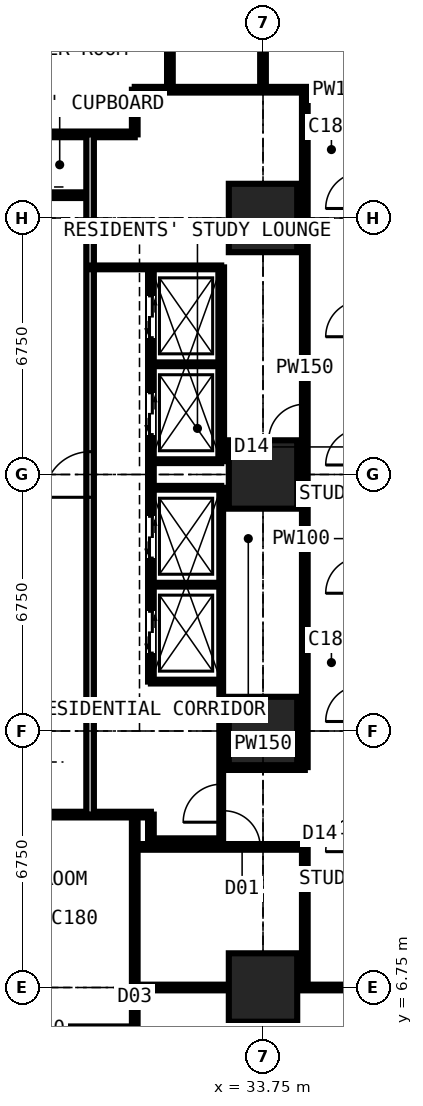
"""IFC4 building model, lengths in metres.
Left out: names, types, materials, properties, quantities, classifications, styles, units other than length and angle.
Written with IfcOpenShell. Run it as: python <this file> out.ifc"""

import sys

from ifc_helpers import new_model, si_unit, direction, frame, frame_2d, origin, origin_2d, place, context, subcontext, project, spatial, rectangle, extrude, element, fill, save


model = new_model("IFC4")
c1 = context("Model", 3, precision=1e-05, world=origin(), true_north=direction((0.0, 1.0)))
c2 = subcontext(c1, "Body", "Model", "MODEL_VIEW")
j1 = project(units=[si_unit("LENGTHUNIT", "METRE"), si_unit("PLANEANGLEUNIT", "RADIAN")], contexts=[c1])
p1 = place(None, origin())
s1 = spatial("IfcSite", under=j1, at=p1, CompositionType="ELEMENT")
p2 = place(p1, origin())
s2 = spatial("IfcBuilding", under=s1, at=p2, CompositionType="ELEMENT")
p3 = place(p2, frame((0.0, 0.0, 61.2)))
s3 = spatial("IfcBuildingStorey", under=s2, at=p3, CompositionType="ELEMENT", Elevation=61.2)
for number, where, z_axis, x_axis in (
    (1, (33.75, 6.75, 0.0), (0.0, 0.0, 1.0), (1.0, 0.0, 0.0)),
    (2, (33.75, 13.5, 0.0), (0.0, 0.0, 1.0), (1.0, 0.0, 0.0)),
    (3, (33.75, 20.25, 0.0), (0.0, 0.0, 1.0), (1.0, 0.0, 0.0)),
    (4, (33.75, 27.0, 0.0), (0.0, 0.0, 1.0), (1.0, 0.0, 0.0)),
):
    element("IfcColumn", number, at=place(p3, frame(where, z_axis=z_axis, x_axis=x_axis)), inside=s3, PredefinedType="COLUMN", context=c2, shape_type="SweptSolid", body=[
        extrude(rectangle(XDim=1.8, YDim=1.8, at=origin_2d()), origin(), (0.0, 0.0, 1.0), 3.6),
    ])
p4 = place(p3, frame((10.125, 11.3, 0.0), z_axis=(0.0, 0.0, 1.0), x_axis=(1.0, 0.0, 0.0)))
e5 = element("IfcWall", 5, at=p4, inside=s3, PredefinedType="PARTITIONING", context=c2, shape_type="SweptSolid", body=[
    extrude(rectangle(XDim=20.675, YDim=0.15, at=frame_2d((10.337, 0.0))), origin(), (0.0, 0.0, 1.0), 3.375),
])
p5 = place(p4, frame((5.2, 0.0, 0.0)))
e6 = element("IfcOpeningElement", 6, at=p5, cuts=e5, PredefinedType="OPENING", context=c2, shape_type="SweptSolid", body=[
    extrude(rectangle(XDim=1.0, YDim=2.2, at=frame_2d((0.5, 1.1))), frame((0.0, 0.085, 0.0), z_axis=(0.0, -1.0, 0.0), x_axis=(1.0, 0.0, 0.0)), (0.0, 0.0, 1.0), 0.17),
])
p6 = place(p4, frame((11.312, 0.0, 0.0)))
e7 = element("IfcOpeningElement", 7, at=p6, cuts=e5, PredefinedType="OPENING", context=c2, shape_type="SweptSolid", body=[
    extrude(rectangle(XDim=1.0, YDim=2.2, at=frame_2d((0.5, 1.1))), frame((0.0, 0.085, 0.0), z_axis=(0.0, -1.0, 0.0), x_axis=(1.0, 0.0, 0.0)), (0.0, 0.0, 1.0), 0.17),
])
p7 = place(p4, frame((2.425, 0.0, 0.0)))
e8 = element("IfcOpeningElement", 8, at=p7, cuts=e5, PredefinedType="OPENING", context=c2, shape_type="SweptSolid", body=[
    extrude(rectangle(XDim=0.95, YDim=2.2, at=frame_2d((0.475, 1.1))), frame((0.0, 0.085, 0.0), z_axis=(0.0, -1.0, 0.0), x_axis=(1.0, 0.0, 0.0)), (0.0, 0.0, 1.0), 0.17),
])
p8 = place(p3, frame((11.3, 29.2, 0.0), z_axis=(0.0, 0.0, 1.0), x_axis=(1.0, 0.0, 0.0)))
e9 = element("IfcWall", 9, at=p8, inside=s3, PredefinedType="PARTITIONING", context=c2, shape_type="SweptSolid", body=[
    extrude(rectangle(XDim=19.075, YDim=0.15, at=frame_2d((9.538, 0.0))), origin(), (0.0, 0.0, 1.0), 3.375),
])
p9 = place(p8, frame((12.875, 0.0, 0.0)))
e10 = element("IfcOpeningElement", 10, at=p9, cuts=e9, PredefinedType="OPENING", context=c2, shape_type="SweptSolid", body=[
    extrude(rectangle(XDim=1.0, YDim=2.2, at=frame_2d((0.5, 1.1))), frame((0.0, 0.085, 0.0), z_axis=(0.0, -1.0, 0.0), x_axis=(1.0, 0.0, 0.0)), (0.0, 0.0, 1.0), 0.17),
])
p10 = place(p8, frame((10.438, 0.0, 0.0)))
e11 = element("IfcOpeningElement", 11, at=p10, cuts=e9, PredefinedType="OPENING", context=c2, shape_type="SweptSolid", body=[
    extrude(rectangle(XDim=1.0, YDim=2.2, at=frame_2d((0.5, 1.1))), frame((0.0, 0.085, 0.0), z_axis=(0.0, -1.0, 0.0), x_axis=(1.0, 0.0, 0.0)), (0.0, 0.0, 1.0), 0.17),
])
p11 = place(p8, frame((14.875, 0.0, 0.0)))
e12 = element("IfcOpeningElement", 12, at=p11, cuts=e9, PredefinedType="OPENING", context=c2, shape_type="SweptSolid", body=[
    extrude(rectangle(XDim=0.95, YDim=2.2, at=frame_2d((0.475, 1.1))), frame((0.0, 0.085, 0.0), z_axis=(0.0, -1.0, 0.0), x_axis=(1.0, 0.0, 0.0)), (0.0, 0.0, 1.0), 0.17),
])
p12 = place(p3, frame((27.6, 27.6, 0.0), z_axis=(0.0, 0.0, 1.0), x_axis=(1.0, 0.0, 0.0)))
e13 = element("IfcWall", 13, at=p12, inside=s3, PredefinedType="PARTITIONING", context=c2, shape_type="SweptSolid", body=[
    extrude(rectangle(XDim=1.6, YDim=0.15, at=frame_2d((0.8, 0.0))), origin(), (0.0, 0.0, 1.0), 2.877),
])
p13 = place(p3, frame((29.2, 11.3, 0.0), z_axis=(0.0, 0.0, 1.0), x_axis=(0.0, 1.0, 0.0)))
e14 = element("IfcWall", 14, at=p13, inside=s3, PredefinedType="PARTITIONING", context=c2, shape_type="SweptSolid", body=[
    extrude(rectangle(XDim=17.9, YDim=0.2, at=frame_2d((8.95, 0.0))), origin(), (0.0, 0.0, 1.0), 3.375),
])
p14 = place(p13, frame((8.35, 0.0, 0.0)))
e15 = element("IfcOpeningElement", 15, at=p14, cuts=e14, PredefinedType="OPENING", context=c2, shape_type="SweptSolid", body=[
    extrude(rectangle(XDim=1.2, YDim=2.2, at=frame_2d((0.6, 1.1))), frame((0.0, 0.11, 0.0), z_axis=(0.0, -1.0, 0.0), x_axis=(1.0, 0.0, 0.0)), (0.0, 0.0, 1.0), 0.22),
])
p15 = place(p3, frame((29.2, 25.7, 0.0), z_axis=(0.0, 0.0, 1.0), x_axis=(1.0, 0.0, 0.0)))
e16 = element("IfcWall", 16, at=p15, inside=s3, PredefinedType="SHEAR", context=c2, shape_type="SweptSolid", body=[
    extrude(rectangle(XDim=3.45, YDim=0.1, at=frame_2d((1.725, 0.0))), origin(), (0.0, 0.0, 1.0), 3.375),
])
p16 = place(p3, frame((30.375, -0.734, 0.0), z_axis=(0.0, 0.0, 1.0), x_axis=(0.0, 1.0, 0.0)))
e17 = element("IfcWall", 17, at=p16, inside=s3, PredefinedType="PARTITIONING", context=c2, shape_type="SweptSolid", body=[
    extrude(rectangle(XDim=12.034, YDim=0.15, at=frame_2d((6.017, 0.0))), origin(), (0.0, 0.0, 1.0), 3.375),
])
p17 = place(p16, frame((5.134, 0.0, 0.0)))
e18 = element("IfcOpeningElement", 18, at=p17, cuts=e17, PredefinedType="OPENING", context=c2, shape_type="SweptSolid", body=[
    extrude(rectangle(XDim=1.0, YDim=2.2, at=frame_2d((0.5, 1.1))), frame((0.0, 0.085, 0.0), z_axis=(0.0, -1.0, 0.0), x_axis=(1.0, 0.0, 0.0)), (0.0, 0.0, 1.0), 0.17),
])
p18 = place(p3, frame((30.375, 6.75, 0.0), z_axis=(0.0, 0.0, 1.0), x_axis=(1.0, 0.0, 0.0)))
e19 = element("IfcWall", 19, at=p18, inside=s3, PredefinedType="PARTITIONING", context=c2, shape_type="SweptSolid", body=[
    extrude(rectangle(XDim=5.975, YDim=0.15, at=frame_2d((2.988, 0.0))), origin(), (0.0, 0.0, 1.0), 2.877),
])
p19 = place(p3, frame((30.375, 10.45, 0.0), z_axis=(0.0, 0.0, 1.0), x_axis=(1.0, 0.0, 0.0)))
e20 = element("IfcWall", 20, at=p19, inside=s3, PredefinedType="PARTITIONING", context=c2, shape_type="SweptSolid", body=[
    extrude(rectangle(XDim=4.475, YDim=0.15, at=frame_2d((2.238, 0.0))), origin(), (0.0, 0.0, 1.0), 3.375),
])
p20 = place(p19, frame((2.35, 0.0, 0.0)))
e21 = element("IfcOpeningElement", 21, at=p20, cuts=e20, PredefinedType="OPENING", context=c2, shape_type="SweptSolid", body=[
    extrude(rectangle(XDim=0.95, YDim=2.2, at=frame_2d((0.475, 1.1))), frame((0.0, 0.085, 0.0), z_axis=(0.0, -1.0, 0.0), x_axis=(1.0, 0.0, 0.0)), (0.0, 0.0, 1.0), 0.17),
])
p21 = place(p3, frame((30.375, 29.2, 0.0), z_axis=(0.0, 0.0, 1.0), x_axis=(0.0, 1.0, 0.0)))
e22 = element("IfcWall", 22, at=p21, inside=s3, PredefinedType="PARTITIONING", context=c2, shape_type="SweptSolid", body=[
    extrude(rectangle(XDim=1.175, YDim=0.15, at=frame_2d((0.587, 0.0))), origin(), (0.0, 0.0, 1.0), 3.375),
])
p22 = place(p3, frame((30.375, 30.375, 0.0), z_axis=(0.0, 0.0, 1.0), x_axis=(1.0, 0.0, 0.0)))
e23 = element("IfcWall", 23, at=p22, inside=s3, PredefinedType="PARTITIONING", context=c2, shape_type="SweptSolid", body=[
    extrude(rectangle(XDim=10.859, YDim=0.15, at=frame_2d((5.429, 0.0))), origin(), (0.0, 0.0, 1.0), 3.375),
])
p23 = place(p3, frame((30.8, 10.6, 0.0), z_axis=(0.0, 0.0, 1.0), x_axis=(0.0, 1.0, 0.0)))
e24 = element("IfcWall", 24, at=p23, inside=s3, PredefinedType="PARTITIONING", context=c2, shape_type="SweptSolid", body=[
    extrude(rectangle(XDim=0.7, YDim=0.15, at=frame_2d((0.35, 0.0))), origin(), (0.0, 0.0, 1.0), 3.375),
])
p24 = place(p3, frame((30.8, 10.6, 0.0), z_axis=(0.0, 0.0, 1.0), x_axis=(1.0, 0.0, 0.0)))
e25 = element("IfcWall", 25, at=p24, inside=s3, PredefinedType="PARTITIONING", context=c2, shape_type="SweptSolid", body=[
    extrude(rectangle(XDim=1.85, YDim=0.15, at=frame_2d((0.925, 0.0))), origin(), (0.0, 0.0, 1.0), 3.375),
])
p25 = place(p3, frame((30.8, 14.8, 0.0), z_axis=(0.0, 0.0, 1.0), x_axis=(0.0, 1.0, 0.0)))
e26 = element("IfcWall", 26, at=p25, inside=s3, PredefinedType="PARTITIONING", context=c2, shape_type="SweptSolid", body=[
    extrude(rectangle(XDim=10.9, YDim=0.15, at=frame_2d((5.45, 0.0))), origin(), (0.0, 0.0, 1.0), 3.375),
])
p26 = place(p25, frame((0.75, 0.0, 0.0)))
e27 = element("IfcOpeningElement", 27, at=p26, cuts=e26, PredefinedType="OPENING", context=c2, shape_type="SweptSolid", body=[
    extrude(rectangle(XDim=1.1, YDim=2.2, at=frame_2d((0.55, 1.1))), frame((0.0, 0.085, 0.0), z_axis=(0.0, -1.0, 0.0), x_axis=(1.0, 0.0, 0.0)), (0.0, 0.0, 1.0), 0.17),
])
p27 = place(p25, frame((3.25, 0.0, 0.0)))
e28 = element("IfcOpeningElement", 28, at=p27, cuts=e26, PredefinedType="OPENING", context=c2, shape_type="SweptSolid", body=[
    extrude(rectangle(XDim=1.1, YDim=2.2, at=frame_2d((0.55, 1.1))), frame((0.0, 0.085, 0.0), z_axis=(0.0, -1.0, 0.0), x_axis=(1.0, 0.0, 0.0)), (0.0, 0.0, 1.0), 0.17),
])
p28 = place(p25, frame((6.5, 0.0, 0.0)))
e29 = element("IfcOpeningElement", 29, at=p28, cuts=e26, PredefinedType="OPENING", context=c2, shape_type="SweptSolid", body=[
    extrude(rectangle(XDim=1.1, YDim=2.2, at=frame_2d((0.55, 1.1))), frame((0.0, 0.085, 0.0), z_axis=(0.0, -1.0, 0.0), x_axis=(1.0, 0.0, 0.0)), (0.0, 0.0, 1.0), 0.17),
])
p29 = place(p25, frame((9.05, 0.0, 0.0)))
e30 = element("IfcOpeningElement", 30, at=p29, cuts=e26, PredefinedType="OPENING", context=c2, shape_type="SweptSolid", body=[
    extrude(rectangle(XDim=1.1, YDim=2.2, at=frame_2d((0.55, 1.1))), frame((0.0, 0.085, 0.0), z_axis=(0.0, -1.0, 0.0), x_axis=(1.0, 0.0, 0.0)), (0.0, 0.0, 1.0), 0.17),
])
for number, where, z_axis, x_axis in (
    (31, (30.8, 14.8, 0.0), (0.0, 0.0, 1.0), (1.0, 0.0, 0.0)),
    (32, (30.8, 17.35, 0.0), (0.0, 0.0, 1.0), (1.0, 0.0, 0.0)),
    (33, (30.8, 19.9, 0.0), (0.0, 0.0, 1.0), (1.0, 0.0, 0.0)),
    (34, (30.8, 20.6, 0.0), (0.0, 0.0, 1.0), (1.0, 0.0, 0.0)),
    (35, (30.8, 23.15, 0.0), (0.0, 0.0, 1.0), (1.0, 0.0, 0.0)),
):
    element("IfcWall", number, at=place(p3, frame(where, z_axis=z_axis, x_axis=x_axis)), inside=s3, PredefinedType="SHEAR", context=c2, shape_type="SweptSolid", body=[
        extrude(rectangle(XDim=1.85, YDim=0.1, at=frame_2d((0.925, 0.0))), origin(), (0.0, 0.0, 1.0), 3.375),
    ])
p30 = place(p3, frame((31.3, 30.375, 0.0), z_axis=(0.0, 0.0, 1.0), x_axis=(0.0, 1.0, 0.0)))
e36 = element("IfcWall", 36, at=p30, inside=s3, PredefinedType="PARTITIONING", context=c2, shape_type="SweptSolid", body=[
    extrude(rectangle(XDim=4.475, YDim=0.15, at=frame_2d((2.238, 0.0))), origin(), (0.0, 0.0, 1.0), 3.375),
])
p31 = place(p3, frame((32.65, 10.6, 0.0), z_axis=(0.0, 0.0, 1.0), x_axis=(0.0, 1.0, 0.0)))
e37 = element("IfcWall", 37, at=p31, inside=s3, PredefinedType="SHEAR", context=c2, shape_type="SweptSolid", body=[
    extrude(rectangle(XDim=9.3, YDim=0.1, at=frame_2d((4.65, 0.0))), origin(), (0.0, 0.0, 1.0), 3.375),
])
p32 = place(p31, frame((0.5, 0.0, 0.0)))
e38 = element("IfcOpeningElement", 38, at=p32, cuts=e37, PredefinedType="OPENING", context=c2, shape_type="SweptSolid", body=[
    extrude(rectangle(XDim=1.0, YDim=2.2, at=frame_2d((0.5, 1.1))), frame((0.0, 0.06, 0.0), z_axis=(0.0, -1.0, 0.0), x_axis=(1.0, 0.0, 0.0)), (0.0, 0.0, 1.0), 0.12),
])
p33 = place(p3, frame((32.65, 12.55, 0.0), z_axis=(0.0, 0.0, 1.0), x_axis=(1.0, 0.0, 0.0)))
e39 = element("IfcWall", 39, at=p33, inside=s3, PredefinedType="PARTITIONING", context=c2, shape_type="SweptSolid", body=[
    extrude(rectangle(XDim=2.2, YDim=0.15, at=frame_2d((1.1, 0.0))), origin(), (0.0, 0.0, 1.0), 3.375),
])
p34 = place(p3, frame((32.65, 20.6, 0.0), z_axis=(0.0, 0.0, 1.0), x_axis=(0.0, 1.0, 0.0)))
e40 = element("IfcWall", 40, at=p34, inside=s3, PredefinedType="PARTITIONING", context=c2, shape_type="SweptSolid", body=[
    extrude(rectangle(XDim=5.1, YDim=0.15, at=frame_2d((2.55, 0.0))), origin(), (0.0, 0.0, 1.0), 3.375),
])
p35 = place(p3, frame((33.75, 30.375, 0.0), z_axis=(0.0, 0.0, 1.0), x_axis=(0.0, 1.0, 0.0)))
e41 = element("IfcWall", 41, at=p35, inside=s3, PredefinedType="PARTITIONING", context=c2, shape_type="SweptSolid", body=[
    extrude(rectangle(XDim=10.859, YDim=0.15, at=frame_2d((5.429, 0.0))), origin(), (0.0, 0.0, 1.0), 2.877),
])
p36 = place(p35, frame((1.45, 0.0, 0.0)))
e42 = element("IfcOpeningElement", 42, at=p36, cuts=e41, PredefinedType="OPENING", context=c2, shape_type="SweptSolid", body=[
    extrude(rectangle(XDim=1.0, YDim=2.2, at=frame_2d((0.5, 1.1))), frame((0.0, 0.085, 0.0), z_axis=(0.0, -1.0, 0.0), x_axis=(1.0, 0.0, 0.0)), (0.0, 0.0, 1.0), 0.17),
])
p37 = place(p3, frame((34.85, 6.75, 0.0), z_axis=(0.0, 0.0, 1.0), x_axis=(0.0, 1.0, 0.0)))
e43 = element("IfcWall", 43, at=p37, inside=s3, PredefinedType="PARTITIONING", context=c2, shape_type="SweptSolid", body=[
    extrude(rectangle(XDim=3.7, YDim=0.15, at=frame_2d((1.85, 0.0))), origin(), (0.0, 0.0, 1.0), 3.375),
])
p38 = place(p3, frame((34.85, 12.55, 0.0), z_axis=(0.0, 0.0, 1.0), x_axis=(0.0, 1.0, 0.0)))
e44 = element("IfcWall", 44, at=p38, inside=s3, PredefinedType="PARTITIONING", context=c2, shape_type="SweptSolid", body=[
    extrude(rectangle(XDim=17.825, YDim=0.15, at=frame_2d((8.913, 0.0))), origin(), (0.0, 0.0, 1.0), 3.375),
])
p39 = place(p38, frame((8.6, 0.0, 0.0)))
e45 = element("IfcOpeningElement", 45, at=p39, cuts=e44, PredefinedType="OPENING", context=c2, shape_type="SweptSolid", body=[
    extrude(rectangle(XDim=0.95, YDim=2.2, at=frame_2d((0.475, 1.1))), frame((0.0, 0.085, 0.0), z_axis=(0.0, -1.0, 0.0), x_axis=(1.0, 0.0, 0.0)), (0.0, 0.0, 1.0), 0.17),
])
p40 = place(p32, origin())
e46 = element("IfcDoor", 46, at=p40, inside=s3, OperationType="SINGLE_SWING_LEFT", PredefinedType="DOOR", context=c2, shape_type="SweptSolid", body=[
    extrude(rectangle(XDim=1.0, YDim=2.2, at=frame_2d((0.5, 1.1))), frame((0.0, 0.025, 0.0), z_axis=(0.0, -1.0, 0.0), x_axis=(1.0, 0.0, 0.0)), (0.0, 0.0, 1.0), 0.05),
])
fill(e38, e46)
p41 = place(p39, origin())
e47 = element("IfcDoor", 47, at=p41, inside=s3, OperationType="SINGLE_SWING_LEFT", PredefinedType="DOOR", context=c2, shape_type="SweptSolid", body=[
    extrude(rectangle(XDim=0.95, YDim=2.2, at=frame_2d((0.475, 1.1))), frame((0.0, 0.025, 0.0), z_axis=(0.0, -1.0, 0.0), x_axis=(1.0, 0.0, 0.0)), (0.0, 0.0, 1.0), 0.05),
])
fill(e45, e47)
p42 = place(p20, origin())
e48 = element("IfcDoor", 48, at=p42, inside=s3, OperationType="SINGLE_SWING_LEFT", PredefinedType="DOOR", context=c2, shape_type="SweptSolid", body=[
    extrude(rectangle(XDim=0.95, YDim=2.2, at=frame_2d((0.475, 1.1))), frame((0.0, 0.025, 0.0), z_axis=(0.0, -1.0, 0.0), x_axis=(1.0, 0.0, 0.0)), (0.0, 0.0, 1.0), 0.05),
])
fill(e21, e48)
p43 = place(p26, origin())
e49 = element("IfcDoor", 49, at=p43, inside=s3, OperationType="DOUBLE_DOOR_SLIDING", PredefinedType="DOOR", context=c2, shape_type="SweptSolid", body=[
    extrude(rectangle(XDim=1.1, YDim=2.2, at=frame_2d((0.55, 1.1))), frame((0.0, 0.025, 0.0), z_axis=(0.0, -1.0, 0.0), x_axis=(1.0, 0.0, 0.0)), (0.0, 0.0, 1.0), 0.05),
])
fill(e27, e49)
p44 = place(p27, origin())
e50 = element("IfcDoor", 50, at=p44, inside=s3, OperationType="DOUBLE_DOOR_SLIDING", PredefinedType="DOOR", context=c2, shape_type="SweptSolid", body=[
    extrude(rectangle(XDim=1.1, YDim=2.2, at=frame_2d((0.55, 1.1))), frame((0.0, 0.025, 0.0), z_axis=(0.0, -1.0, 0.0), x_axis=(1.0, 0.0, 0.0)), (0.0, 0.0, 1.0), 0.05),
])
fill(e28, e50)
p45 = place(p28, origin())
e51 = element("IfcDoor", 51, at=p45, inside=s3, OperationType="DOUBLE_DOOR_SLIDING", PredefinedType="DOOR", context=c2, shape_type="SweptSolid", body=[
    extrude(rectangle(XDim=1.1, YDim=2.2, at=frame_2d((0.55, 1.1))), frame((0.0, 0.025, 0.0), z_axis=(0.0, -1.0, 0.0), x_axis=(1.0, 0.0, 0.0)), (0.0, 0.0, 1.0), 0.05),
])
fill(e29, e51)
p46 = place(p29, origin())
e52 = element("IfcDoor", 52, at=p46, inside=s3, OperationType="DOUBLE_DOOR_SLIDING", PredefinedType="DOOR", context=c2, shape_type="SweptSolid", body=[
    extrude(rectangle(XDim=1.1, YDim=2.2, at=frame_2d((0.55, 1.1))), frame((0.0, 0.025, 0.0), z_axis=(0.0, -1.0, 0.0), x_axis=(1.0, 0.0, 0.0)), (0.0, 0.0, 1.0), 0.05),
])
fill(e30, e52)
p47 = place(p14, origin())
e53 = element("IfcDoor", 53, at=p47, inside=s3, OperationType="DOUBLE_DOOR_SINGLE_SWING", PredefinedType="DOOR", context=c2, shape_type="SweptSolid", body=[
    extrude(rectangle(XDim=1.2, YDim=2.2, at=frame_2d((0.6, 1.1))), frame((0.0, 0.025, 0.0), z_axis=(0.0, -1.0, 0.0), x_axis=(1.0, 0.0, 0.0)), (0.0, 0.0, 1.0), 0.05),
])
fill(e15, e53)
save(model, sys.argv[1])
